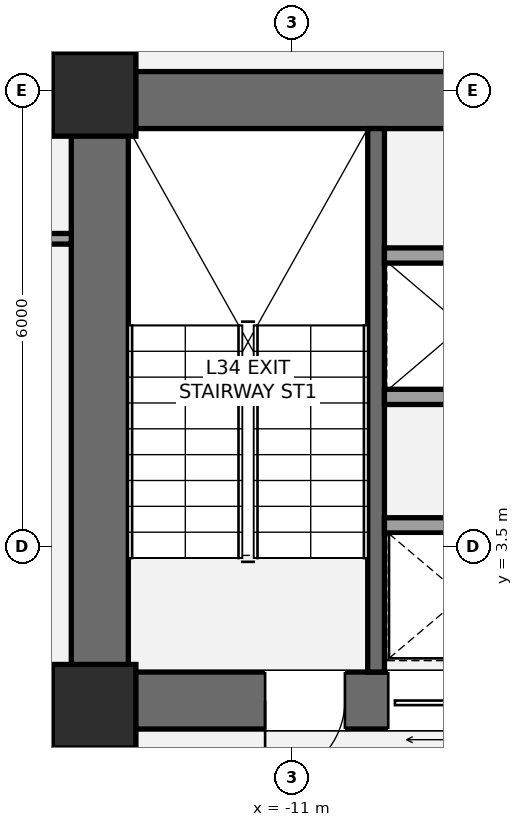
"""IFC4 building model, lengths in metres.
Left out: names, types, materials, properties, quantities, classifications, styles, units other than length and angle.
Written with IfcOpenShell. Run it as: python <this file> out.ifc"""

import sys

from ifc_helpers import new_model, si_unit, direction, frame, frame_2d, origin, origin_2d, place, context, subcontext, project, spatial, rectangle, extrude, element, fill, save


model = new_model("IFC4")
c1 = context("Model", 3, precision=1e-05, world=origin(), true_north=direction((0.0, 1.0)))
c2 = subcontext(c1, "Body", "Model", "MODEL_VIEW")
j1 = project(units=[si_unit("LENGTHUNIT", "METRE"), si_unit("PLANEANGLEUNIT", "RADIAN")], contexts=[c1])
p1 = place(None, origin())
s1 = spatial("IfcSite", under=j1, at=p1, CompositionType="ELEMENT")
p2 = place(p1, origin())
s2 = spatial("IfcBuilding", under=s1, at=p2, CompositionType="ELEMENT")
p3 = place(p2, frame((0.0, 0.0, 128.1)))
s3 = spatial("IfcBuildingStorey", under=s2, at=p3, CompositionType="ELEMENT", Elevation=128.1)
p4 = place(p3, frame((-13.525, 1.1, 0.0), z_axis=(0.0, 0.0, 1.0), x_axis=(0.0, 1.0, 0.0)))
e1 = element("IfcWall", 1, at=p4, inside=s3, PredefinedType="SHEAR", context=c2, shape_type="SweptSolid", body=[
    extrude(rectangle(XDim=8.65, YDim=0.75, at=frame_2d((4.325, 0.0))), origin(), (0.0, 0.0, 1.0), 3.5),
])
p5 = place(p3, frame((-13.9, 9.375, 0.0), z_axis=(0.0, 0.0, 1.0), x_axis=(1.0, 0.0, 0.0)))
e2 = element("IfcWall", 2, at=p5, inside=s3, PredefinedType="SHEAR", context=c2, shape_type="SweptSolid", body=[
    extrude(rectangle(XDim=9.475, YDim=0.75, at=frame_2d((4.737, 0.0))), origin(), (0.0, 0.0, 1.0), 3.5),
])
p6 = place(p3, frame((-4.825, 1.475, 0.0), z_axis=(0.0, 0.0, 1.0), x_axis=(-1.0, 0.0, 0.0)))
e3 = element("IfcWall", 3, at=p6, inside=s3, PredefinedType="SHEAR", context=c2, shape_type="SweptSolid", body=[
    extrude(rectangle(XDim=9.075, YDim=0.75, at=frame_2d((4.538, 0.0))), origin(), (0.0, 0.0, 1.0), 3.5),
])
p7 = place(p6, frame((5.475, 0.0, 0.0)))
e4 = element("IfcOpeningElement", 4, at=p7, cuts=e3, PredefinedType="OPENING", context=c2, shape_type="SweptSolid", body=[
    extrude(rectangle(XDim=1.05, YDim=2.15, at=frame_2d((0.525, 1.075))), frame((0.0, 0.385, 0.0), z_axis=(0.0, -1.0, 0.0), x_axis=(1.0, 0.0, 0.0)), (0.0, 0.0, 1.0), 0.77),
])
p8 = place(p6, frame((3.805, 0.0, 0.0)))
e5 = element("IfcOpeningElement", 5, at=p8, cuts=e3, PredefinedType="OPENING", context=c2, shape_type="SweptSolid", body=[
    extrude(rectangle(XDim=1.1, YDim=2.2, at=frame_2d((0.55, 1.1))), frame((0.0, 0.385, 0.0), z_axis=(0.0, -1.0, 0.0), x_axis=(1.0, 0.0, 0.0)), (0.0, 0.0, 1.0), 0.77),
])
p9 = place(p3, frame((-9.89, 1.85, 0.0), z_axis=(0.0, 0.0, 1.0), x_axis=(0.0, 1.0, 0.0)))
e6 = element("IfcWall", 6, at=p9, inside=s3, PredefinedType="SHEAR", context=c2, shape_type="SweptSolid", body=[
    extrude(rectangle(XDim=7.15, YDim=0.22, at=frame_2d((3.575, 0.0))), origin(), (0.0, 0.0, 1.0), 3.5),
])
for number, where, z_axis, x_axis in (
    (7, (-13.6, 1.4, 0.0), (0.0, 0.0, 1.0), (1.0, 0.0, 0.0)),
    (8, (-13.6, 9.45, 0.0), (0.0, 0.0, 1.0), (1.0, 0.0, 0.0)),
):
    element("IfcColumn", number, at=place(p3, frame(where, z_axis=z_axis, x_axis=x_axis)), inside=s3, PredefinedType="COLUMN", context=c2, shape_type="SweptSolid", body=[
        extrude(rectangle(XDim=1.1, YDim=1.1, at=origin_2d()), origin(), (0.0, 0.0, 1.0), 3.5),
    ])
p10 = place(p3, frame((-13.45, -2.15, 0.0), z_axis=(0.0, 0.0, 1.0), x_axis=(0.0, 1.0, 0.0)))
e9 = element("IfcWall", 9, at=p10, inside=s3, PredefinedType="PARTITIONING", context=c2, shape_type="SweptSolid", body=[
    extrude(rectangle(XDim=3.3, YDim=0.165, at=frame_2d((1.65, 0.0))), origin(), (0.0, 0.0, 1.0), 2.763),
])
p11 = place(p10, frame((1.15, 0.0, 0.0)))
e10 = element("IfcOpeningElement", 10, at=p11, cuts=e9, PredefinedType="OPENING", context=c2, shape_type="SweptSolid", body=[
    extrude(rectangle(XDim=1.05, YDim=2.15, at=frame_2d((0.525, 1.075))), frame((0.0, 0.093, 0.0), z_axis=(0.0, -1.0, 0.0), x_axis=(1.0, 0.0, 0.0)), (0.0, 0.0, 1.0), 0.185),
])
for number, where, z_axis, x_axis in (
    (11, (-9.78, 3.78, 0.0), (0.0, 0.0, 1.0), (1.0, 0.0, 0.0)),
    (12, (-9.78, 5.47, 0.0), (0.0, 0.0, 1.0), (1.0, 0.0, 0.0)),
    (13, (-9.78, 7.33, 0.0), (0.0, 0.0, 1.0), (1.0, 0.0, 0.0)),
):
    element("IfcWall", number, at=place(p3, frame(where, z_axis=z_axis, x_axis=x_axis)), inside=s3, PredefinedType="SOLIDWALL", context=c2, shape_type="SweptSolid", body=[
        extrude(rectangle(XDim=4.205, YDim=0.2, at=frame_2d((2.103, 0.0))), origin(), (0.0, 0.0, 1.0), 3.31),
    ])
p12 = place(p3, frame((-15.7, 7.55, 0.0), z_axis=(0.0, 0.0, 1.0), x_axis=(1.0, 0.0, 0.0)))
e14 = element("IfcWall", 14, at=p12, inside=s3, PredefinedType="PARTITIONING", context=c2, shape_type="SweptSolid", body=[
    extrude(rectangle(XDim=1.8, YDim=0.14, at=frame_2d((0.9, 0.0))), origin(), (0.0, 0.0, 1.0), 2.763),
])
p13 = place(p12, frame((0.32, 0.0, 0.0)))
e15 = element("IfcOpeningElement", 15, at=p13, cuts=e14, PredefinedType="OPENING", context=c2, shape_type="SweptSolid", body=[
    extrude(rectangle(XDim=0.92, YDim=2.15, at=frame_2d((0.46, 1.075))), frame((0.0, 0.08, 0.0), z_axis=(0.0, -1.0, 0.0), x_axis=(1.0, 0.0, 0.0)), (0.0, 0.0, 1.0), 0.16),
])
p14 = place(p7, origin())
e16 = element("IfcDoor", 16, at=p14, inside=s3, OperationType="SINGLE_SWING_RIGHT", PredefinedType="DOOR", context=c2, shape_type="SweptSolid", body=[
    extrude(rectangle(XDim=1.05, YDim=2.15, at=frame_2d((0.525, 1.075))), frame((0.0, 0.025, 0.0), z_axis=(0.0, -1.0, 0.0), x_axis=(1.0, 0.0, 0.0)), (0.0, 0.0, 1.0), 0.05),
])
fill(e4, e16)
p15 = place(p8, origin())
e17 = element("IfcDoor", 17, at=p15, inside=s3, OperationType="SLIDING_TO_LEFT", PredefinedType="DOOR", context=c2, shape_type="SweptSolid", body=[
    extrude(rectangle(XDim=1.1, YDim=2.2, at=frame_2d((0.55, 1.1))), frame((0.0, 0.025, 0.0), z_axis=(0.0, -1.0, 0.0), x_axis=(1.0, 0.0, 0.0)), (0.0, 0.0, 1.0), 0.05),
])
fill(e5, e17)
save(model, sys.argv[1])
